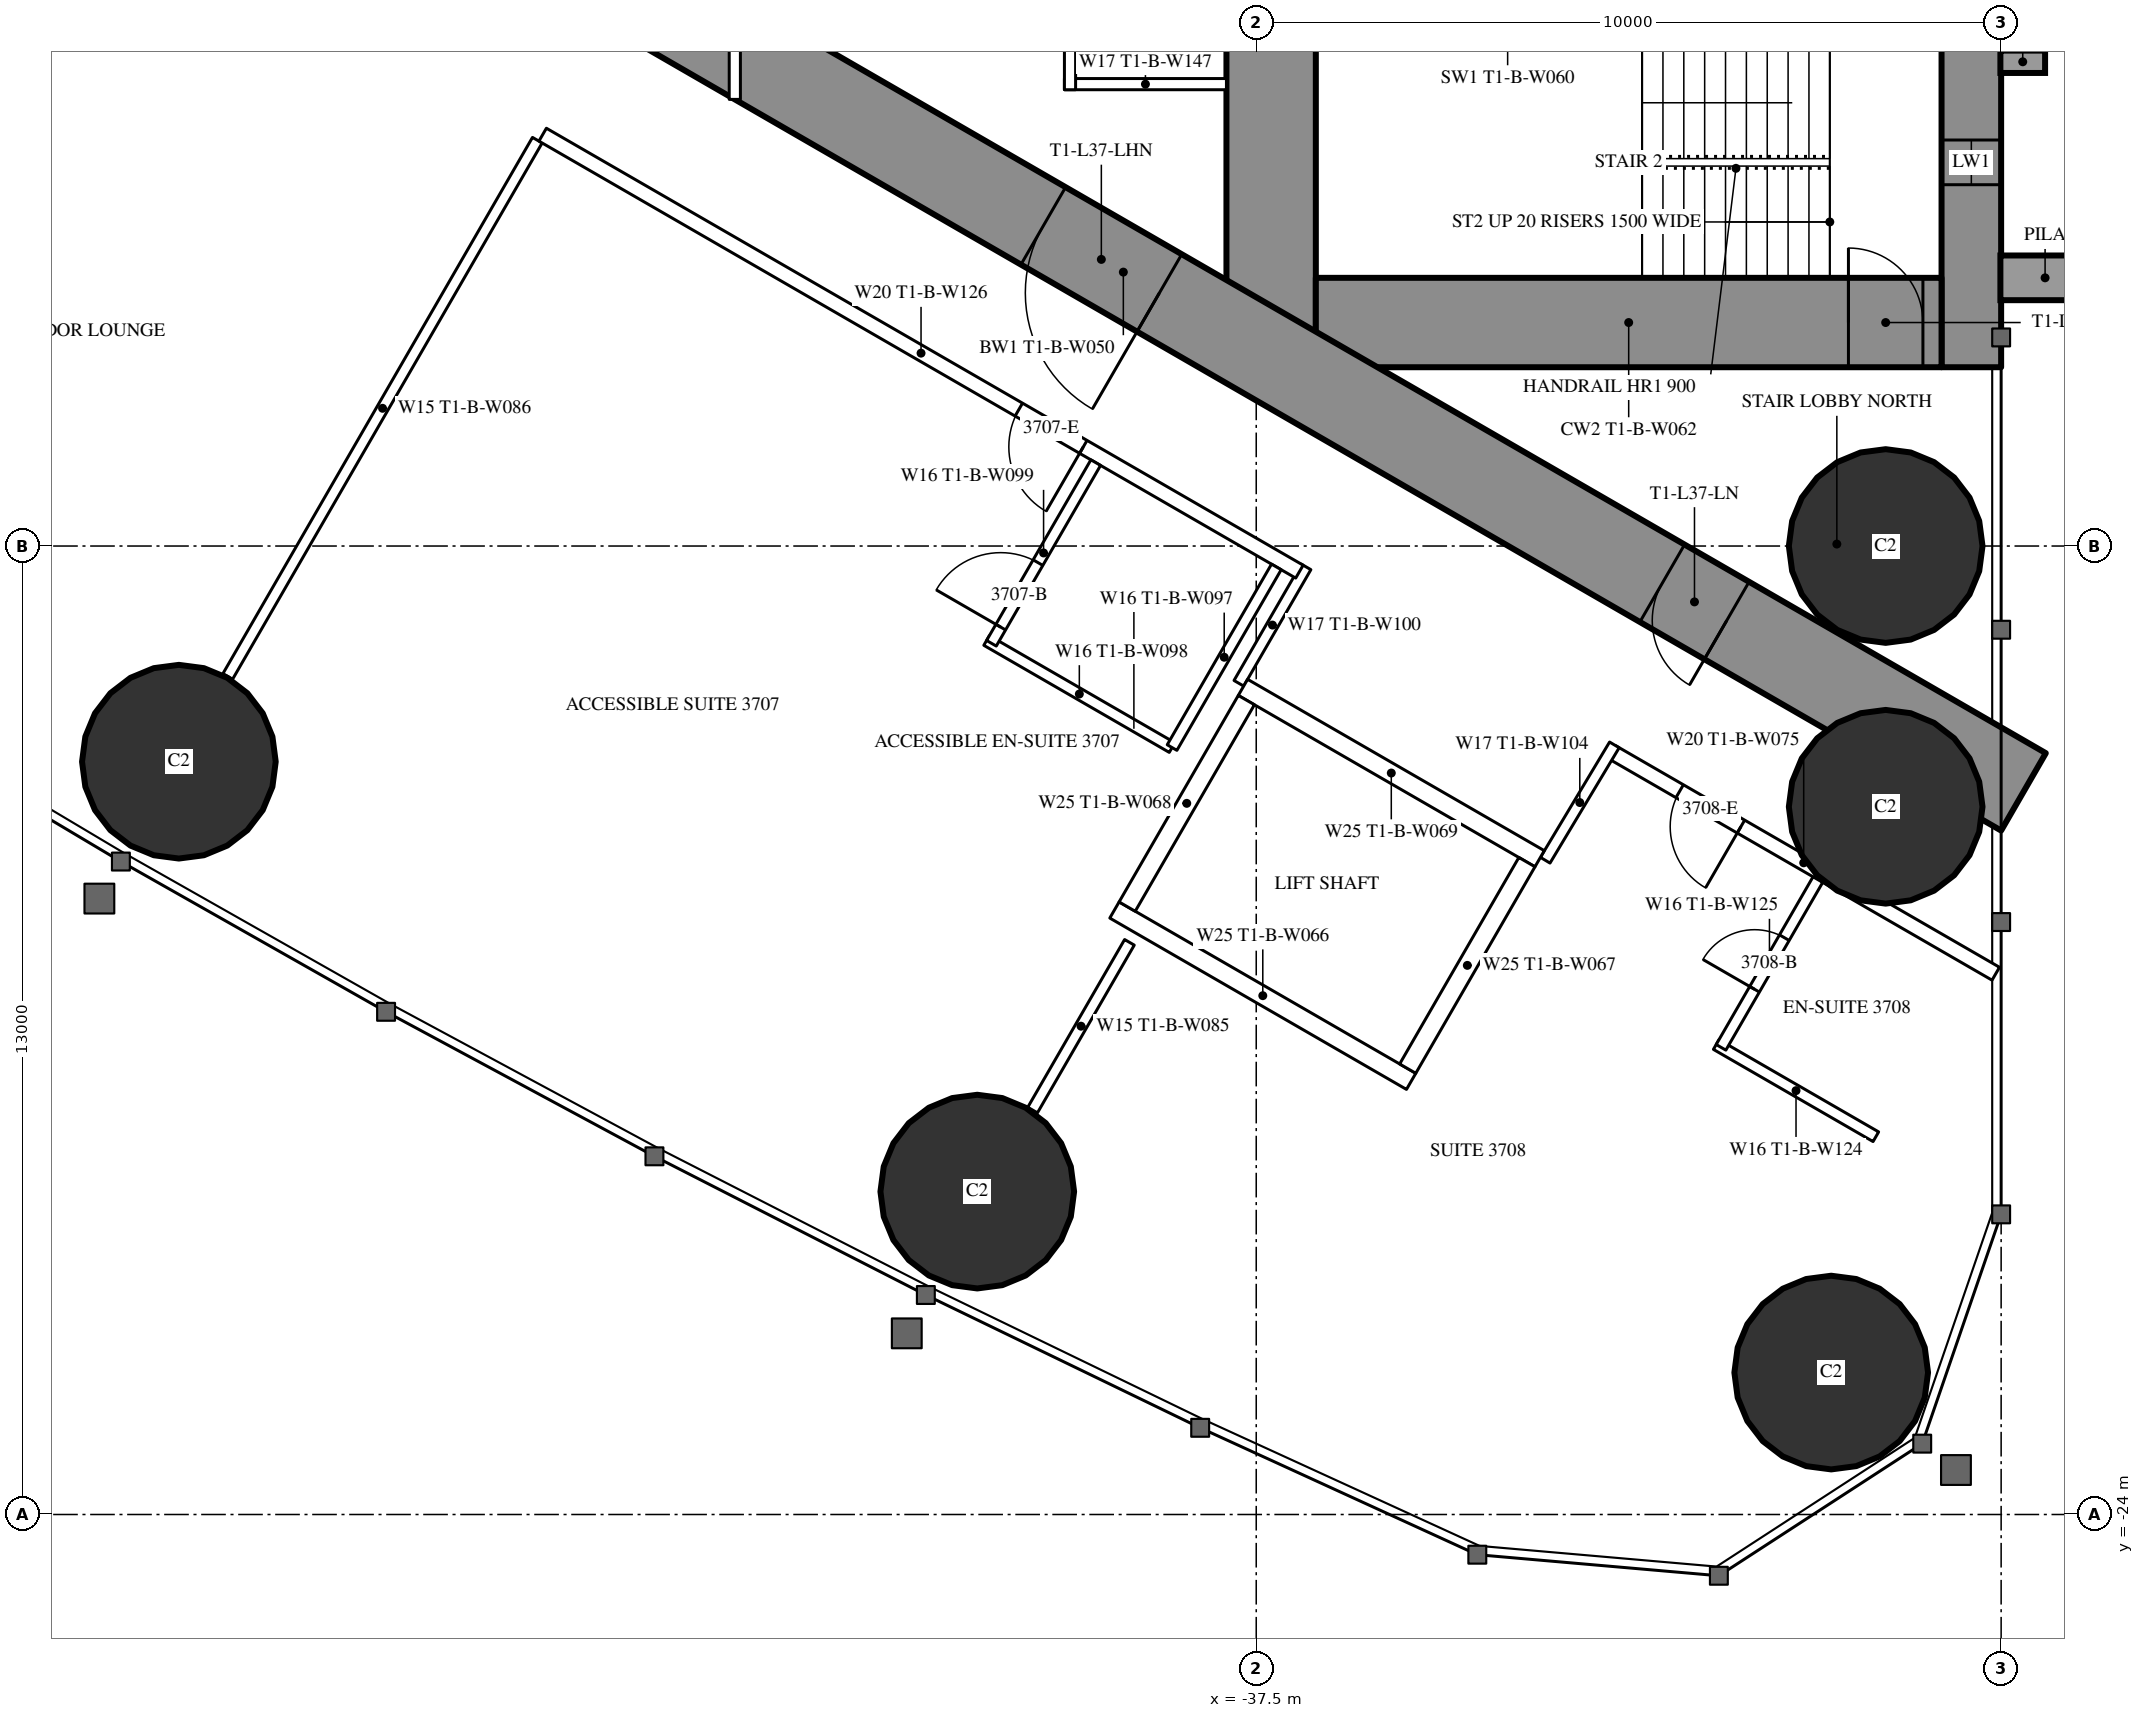
"""IFC4 building model, lengths in metres.
Left out: names, types, materials, properties, quantities, classifications, styles, units other than length and angle.
Written with IfcOpenShell. Run it as: python <this file> out.ifc"""

import sys

from ifc_helpers import new_model, si_unit, direction, frame, frame_2d, origin, origin_2d, place, context, subcontext, project, spatial, rectangle, hollow_circle, extrude, element, fill, save


model = new_model("IFC4")
c1 = context("Model", 3, precision=1e-05, world=origin(), true_north=direction((0.0, 1.0)))
c2 = subcontext(c1, "Body", "Model", "MODEL_VIEW")
j1 = project(units=[si_unit("LENGTHUNIT", "METRE"), si_unit("PLANEANGLEUNIT", "RADIAN")], contexts=[c1])
p1 = place(None, origin())
s1 = spatial("IfcSite", under=j1, at=p1, CompositionType="ELEMENT")
p2 = place(p1, origin())
s2 = spatial("IfcBuilding", under=s1, at=p2, CompositionType="ELEMENT")
p3 = place(p2, frame((0.0, 0.0, 139.6)))
s3 = spatial("IfcBuildingStorey", under=s2, at=p3, CompositionType="ELEMENT", Elevation=139.6)
for number, where, z_axis, x_axis in (
    (1, (-29.781, -22.095, 0.0), (0.0, 0.0, 1.0), (1.0, 0.0, 0.0)),
    (2, (-29.05, -11.0, 0.0), (0.0, 0.0, 1.0), (1.0, 0.0, 0.0)),
    (3, (-29.05, -14.5, 0.0), (0.0, 0.0, 1.0), (1.0, 0.0, 0.0)),
    (4, (-51.963, -13.895, 0.0), (0.0, 0.0, 1.0), (1.0, 0.0, 0.0)),
    (5, (-41.245, -19.666, 0.0), (0.0, 0.0, 1.0), (1.0, 0.0, 0.0)),
):
    element("IfcColumn", number, at=place(p3, frame(where, z_axis=z_axis, x_axis=x_axis)), inside=s3, PredefinedType="COLUMN", context=c2, shape_type="SweptSolid", body=[
        extrude(hollow_circle(Radius=1.3, WallThickness=0.1, at=origin_2d()), origin(), (0.0, 0.0, 1.0), 3.5),
    ])
p4 = place(p3, frame((-27.9, 8.6, 0.0), z_axis=(0.0, 0.0, 1.0), x_axis=(0.0, -1.0, 0.0)))
e6 = element("IfcWall", 6, at=p4, inside=s3, PredefinedType="SHEAR", context=c2, shape_type="SweptSolid", body=[
    extrude(rectangle(XDim=17.2, YDim=0.8, at=frame_2d((8.6, 0.0))), origin(), (0.0, 0.0, 1.0), 3.5),
])
p5 = place(p4, frame((2.45, 0.0, 0.6)))
e7 = element("IfcOpeningElement", 7, at=p5, cuts=e6, PredefinedType="OPENING", context=c2, shape_type="SweptSolid", body=[
    extrude(rectangle(XDim=0.6, YDim=2.1, at=frame_2d((0.3, 1.05))), frame((0.0, 0.41, 0.0), z_axis=(0.0, -1.0, 0.0), x_axis=(1.0, 0.0, 0.0)), (0.0, 0.0, 1.0), 0.82),
])
p6 = place(p4, frame((14.15, 0.0, 0.6)))
e8 = element("IfcOpeningElement", 8, at=p6, cuts=e6, PredefinedType="OPENING", context=c2, shape_type="SweptSolid", body=[
    extrude(rectangle(XDim=0.6, YDim=2.1, at=frame_2d((0.3, 1.05))), frame((0.0, 0.41, 0.0), z_axis=(0.0, -1.0, 0.0), x_axis=(1.0, 0.0, 0.0)), (0.0, 0.0, 1.0), 0.82),
])
p7 = place(p3, frame((-37.3, 8.6, 0.0), z_axis=(0.0, 0.0, 1.0), x_axis=(0.0, -1.0, 0.0)))
e9 = element("IfcWall", 9, at=p7, inside=s3, PredefinedType="SHEAR", context=c2, shape_type="SweptSolid", body=[
    extrude(rectangle(XDim=17.2, YDim=1.2, at=frame_2d((8.6, 0.0))), origin(), (0.0, 0.0, 1.0), 3.5),
])
p8 = place(p7, frame((7.7, 0.0, 0.0)))
e10 = element("IfcOpeningElement", 10, at=p8, cuts=e9, PredefinedType="OPENING", context=c2, shape_type="SweptSolid", body=[
    extrude(rectangle(XDim=1.8, YDim=2.2, at=frame_2d((0.9, 1.1))), frame((0.0, 0.61, 0.0), z_axis=(0.0, -1.0, 0.0), x_axis=(1.0, 0.0, 0.0)), (0.0, 0.0, 1.0), 1.22),
])
p9 = place(p3, frame((-28.3, -8.0, 0.0), z_axis=(0.0, 0.0, 1.0), x_axis=(-1.0, 0.0, 0.0)))
e11 = element("IfcWall", 11, at=p9, inside=s3, PredefinedType="SHEAR", context=c2, shape_type="SweptSolid", body=[
    extrude(rectangle(XDim=8.4, YDim=1.2, at=frame_2d((4.2, 0.0))), origin(), (0.0, 0.0, 1.0), 3.5),
])
p10 = place(p9, frame((0.25, 0.0, 0.0)))
e12 = element("IfcOpeningElement", 12, at=p10, cuts=e11, PredefinedType="OPENING", context=c2, shape_type="SweptSolid", body=[
    extrude(rectangle(XDim=1.0, YDim=2.2, at=frame_2d((0.5, 1.1))), frame((0.0, 0.61, 0.0), z_axis=(0.0, -1.0, 0.0), x_axis=(1.0, 0.0, 0.0)), (0.0, 0.0, 1.0), 1.22),
])
p11 = place(p3, frame((-27.2, -14.3, 0.0), z_axis=(0.0, 0.0, 1.0), x_axis=(-0.866024021859, 0.500002393557, 0.0)))
e13 = element("IfcWall", 13, at=p11, inside=s3, PredefinedType="SHEAR", context=c2, shape_type="SweptSolid", body=[
    extrude(rectangle(XDim=27.907, YDim=1.2, at=frame_2d((13.954, 0.0))), origin(), (0.0, 0.0, 1.0), 3.5),
])
p12 = place(p11, frame((4.6, 0.0, 0.0)))
e14 = element("IfcOpeningElement", 14, at=p12, cuts=e13, PredefinedType="OPENING", context=c2, shape_type="SweptSolid", body=[
    extrude(rectangle(XDim=1.0, YDim=2.2, at=frame_2d((0.5, 1.1))), frame((0.0, 0.61, 0.0), z_axis=(0.0, -1.0, 0.0), x_axis=(1.0, 0.0, 0.0)), (0.0, 0.0, 1.0), 1.22),
])
p13 = place(p11, frame((13.395, 0.0, 0.0)))
e15 = element("IfcOpeningElement", 15, at=p13, cuts=e13, PredefinedType="OPENING", context=c2, shape_type="SweptSolid", body=[
    extrude(rectangle(XDim=1.8, YDim=2.2, at=frame_2d((0.9, 1.1))), frame((0.0, 0.61, 0.0), z_axis=(0.0, -1.0, 0.0), x_axis=(1.0, 0.0, 0.0)), (0.0, 0.0, 1.0), 1.22),
])
p14 = place(p3, frame((-47.151, -5.552, 0.0), z_axis=(0.0, 0.0, 1.0), x_axis=(-0.500003012045, -0.866023664773, 0.0)))
e16 = element("IfcWall", 16, at=p14, inside=s3, PredefinedType="PARTITIONING", context=c2, shape_type="SweptSolid", body=[
    extrude(rectangle(XDim=8.311, YDim=0.15, at=frame_2d((4.156, 0.0))), origin(), (0.0, 0.0, 1.0), 2.2),
])
p15 = place(p3, frame((-39.202, -16.32, 0.0), z_axis=(0.0, 0.0, 1.0), x_axis=(-0.49997716683, -0.86603858612, 0.0)))
e17 = element("IfcWall", 17, at=p15, inside=s3, PredefinedType="PARTITIONING", context=c2, shape_type="SweptSolid", body=[
    extrude(rectangle(XDim=2.6, YDim=0.15, at=frame_2d((1.3, 0.0))), origin(), (0.0, 0.0, 1.0), 3.25),
])
p16 = place(p3, frame((-27.572, -16.741, 0.0), z_axis=(0.0, 0.0, 1.0), x_axis=(-0.866024464444, 0.500001626982, 0.0)))
e18 = element("IfcWall", 18, at=p16, inside=s3, PredefinedType="PARTITIONING", context=c2, shape_type="SweptSolid", body=[
    extrude(rectangle(XDim=5.955, YDim=0.2, at=frame_2d((2.978, 0.0))), origin(), (0.0, 0.0, 1.0), 3.25),
])
p17 = place(p16, frame((3.95, 0.0, 0.0)))
e19 = element("IfcOpeningElement", 19, at=p17, cuts=e18, PredefinedType="OPENING", context=c2, shape_type="SweptSolid", body=[
    extrude(rectangle(XDim=0.95, YDim=2.2, at=frame_2d((0.475, 1.1))), frame((0.0, 0.11, 0.0), z_axis=(0.0, -1.0, 0.0), x_axis=(1.0, 0.0, 0.0)), (0.0, 0.0, 1.0), 0.22),
])
p18 = place(p3, frame((-36.831, -11.28, 0.0), z_axis=(0.0, 0.0, 1.0), x_axis=(-0.499937177781, -0.866061671171, 0.0)))
e20 = element("IfcWall", 20, at=p18, inside=s3, PredefinedType="PARTITIONING", context=c2, shape_type="SweptSolid", body=[
    extrude(rectangle(XDim=1.804, YDim=0.15, at=frame_2d((0.902, 0.0))), origin(), (0.0, 0.0, 1.0), 3.25),
])
p19 = place(p3, frame((-33.621, -15.218, 0.0), z_axis=(0.0, 0.0, 1.0), x_axis=(0.514336634837, 0.857588377991, 0.0)))
e21 = element("IfcWall", 21, at=p19, inside=s3, PredefinedType="PARTITIONING", context=c2, shape_type="SweptSolid", body=[
    extrude(rectangle(XDim=1.805, YDim=0.15, at=frame_2d((0.903, 0.0))), origin(), (0.0, 0.0, 1.0), 3.25),
])
p20 = place(p3, frame((-36.92, -11.344, 0.0), z_axis=(0.0, 0.0, 1.0), x_axis=(-0.866027897759, 0.499995680284, 0.0)))
e22 = element("IfcWall", 22, at=p20, inside=s3, PredefinedType="PARTITIONING", context=c2, shape_type="SweptSolid", body=[
    extrude(rectangle(XDim=11.731, YDim=0.2, at=frame_2d((5.865, 0.0))), origin(), (0.0, 0.0, 1.0), 3.25),
])
p21 = place(p20, frame((3.35, 0.0, 0.0)))
e23 = element("IfcOpeningElement", 23, at=p21, cuts=e22, PredefinedType="OPENING", context=c2, shape_type="SweptSolid", body=[
    extrude(rectangle(XDim=1.0, YDim=2.2, at=frame_2d((0.5, 1.1))), frame((0.0, 0.11, 0.0), z_axis=(0.0, -1.0, 0.0), x_axis=(1.0, 0.0, 0.0)), (0.0, 0.0, 1.0), 0.22),
])
p22 = place(p3, frame((-38.63, -13.705, 0.0), z_axis=(0.0, 0.0, 1.0), x_axis=(-0.866018712932, 0.500011588718, 0.0)))
e24 = element("IfcWall", 24, at=p22, inside=s3, PredefinedType="PARTITIONING", context=c2, shape_type="SweptSolid", body=[
    extrude(rectangle(XDim=2.875, YDim=0.15, at=frame_2d((1.438, 0.0))), origin(), (0.0, 0.0, 1.0), 3.25),
])
p23 = place(p3, frame((-39.655, -9.88, 0.0), z_axis=(0.0, 0.0, 1.0), x_axis=(-0.500049511043, -0.865996816683, 0.0)))
e25 = element("IfcWall", 25, at=p23, inside=s3, PredefinedType="PARTITIONING", context=c2, shape_type="SweptSolid", body=[
    extrude(rectangle(XDim=2.8, YDim=0.15, at=frame_2d((1.4, 0.0))), origin(), (0.0, 0.0, 1.0), 3.25),
])
p24 = place(p23, frame((1.55, 0.0, 0.0)))
e26 = element("IfcOpeningElement", 26, at=p24, cuts=e25, PredefinedType="OPENING", context=c2, shape_type="SweptSolid", body=[
    extrude(rectangle(XDim=1.0, YDim=2.2, at=frame_2d((0.5, 1.1))), frame((0.0, 0.085, 0.0), z_axis=(0.0, -1.0, 0.0), x_axis=(1.0, 0.0, 0.0)), (0.0, 0.0, 1.0), 0.17),
])
p25 = place(p3, frame((-37.23, -11.281, 0.0), z_axis=(0.0, 0.0, 1.0), x_axis=(-0.500049511043, -0.865996816683, 0.0)))
e27 = element("IfcWall", 27, at=p25, inside=s3, PredefinedType="PARTITIONING", context=c2, shape_type="SweptSolid", body=[
    extrude(rectangle(XDim=2.8, YDim=0.15, at=frame_2d((1.4, 0.0))), origin(), (0.0, 0.0, 1.0), 3.25),
])
p26 = place(p3, frame((-29.182, -18.929, 0.0), z_axis=(0.0, 0.0, 1.0), x_axis=(-0.866006523861, 0.500032699561, 0.0)))
e28 = element("IfcWall", 28, at=p26, inside=s3, PredefinedType="PARTITIONING", context=c2, shape_type="SweptSolid", body=[
    extrude(rectangle(XDim=2.475, YDim=0.15, at=frame_2d((1.237, 0.0))), origin(), (0.0, 0.0, 1.0), 3.25),
])
p27 = place(p3, frame((-29.96, -15.478, 0.0), z_axis=(0.0, 0.0, 1.0), x_axis=(-0.500006934395, -0.866021400173, 0.0)))
e29 = element("IfcWall", 29, at=p27, inside=s3, PredefinedType="PARTITIONING", context=c2, shape_type="SweptSolid", body=[
    extrude(rectangle(XDim=2.6, YDim=0.15, at=frame_2d((1.3, 0.0))), origin(), (0.0, 0.0, 1.0), 3.25),
])
p28 = place(p27, frame((0.9, 0.0, 0.0)))
e30 = element("IfcOpeningElement", 30, at=p28, cuts=e29, PredefinedType="OPENING", context=c2, shape_type="SweptSolid", body=[
    extrude(rectangle(XDim=0.8, YDim=2.2, at=frame_2d((0.4, 1.1))), frame((0.0, 0.085, 0.0), z_axis=(0.0, -1.0, 0.0), x_axis=(1.0, 0.0, 0.0)), (0.0, 0.0, 1.0), 0.17),
])
p29 = place(p3, frame((-37.9, -4.8, 0.0), z_axis=(0.0, 0.0, 1.0), x_axis=(-1.0, 0.0, 0.0)))
e31 = element("IfcWall", 31, at=p29, inside=s3, PredefinedType="PARTITIONING", context=c2, shape_type="SweptSolid", body=[
    extrude(rectangle(XDim=2.175, YDim=0.15, at=frame_2d((1.087, 0.0))), origin(), (0.0, 0.0, 1.0), 3.25),
])
p30 = place(p3, frame((-40.0, -1.125, 0.0), z_axis=(0.0, 0.0, 1.0), x_axis=(0.0, -1.0, 0.0)))
e32 = element("IfcWall", 32, at=p30, inside=s3, PredefinedType="PARTITIONING", context=c2, shape_type="SweptSolid", body=[
    extrude(rectangle(XDim=3.75, YDim=0.15, at=frame_2d((1.875, 0.0))), origin(), (0.0, 0.0, 1.0), 3.25),
])
p31 = place(p30, frame((1.375, 0.0, 0.0)))
e33 = element("IfcOpeningElement", 33, at=p31, cuts=e32, PredefinedType="OPENING", context=c2, shape_type="SweptSolid", body=[
    extrude(rectangle(XDim=1.0, YDim=2.2, at=frame_2d((0.5, 1.1))), frame((0.0, 0.085, 0.0), z_axis=(0.0, -1.0, 0.0), x_axis=(1.0, 0.0, 0.0)), (0.0, 0.0, 1.0), 0.17),
])
p32 = place(p3, frame((-44.5, 5.005, 0.0), z_axis=(0.0, 0.0, 1.0), x_axis=(0.0, -1.0, 0.0)))
e34 = element("IfcWall", 34, at=p32, inside=s3, PredefinedType="PARTITIONING", context=c2, shape_type="SweptSolid", body=[
    extrude(rectangle(XDim=10.009, YDim=0.15, at=frame_2d((5.005, 0.0))), origin(), (0.0, 0.0, 1.0), 2.45),
])
p33 = place(p32, frame((4.505, 0.0, 0.0)))
e35 = element("IfcOpeningElement", 35, at=p33, cuts=e34, PredefinedType="OPENING", context=c2, shape_type="SweptSolid", body=[
    extrude(rectangle(XDim=1.0, YDim=2.2, at=frame_2d((0.5, 1.1))), frame((0.0, 0.085, 0.0), z_axis=(0.0, -1.0, 0.0), x_axis=(1.0, 0.0, 0.0)), (0.0, 0.0, 1.0), 0.17),
])
p34 = place(p3, frame((-33.696, -15.197, 0.0), z_axis=(0.0, 0.0, 1.0), x_axis=(-0.865976953817, 0.500083908417, 0.0)))
e36 = element("IfcWall", 36, at=p34, inside=s3, PredefinedType="PARTITIONING", context=c2, shape_type="SweptSolid", body=[
    extrude(rectangle(XDim=4.599, YDim=0.25, at=frame_2d((2.3, 0.0))), origin(), (0.0, 0.0, 1.0), 3.25),
])
p35 = place(p3, frame((-35.42, -18.186, 0.0), z_axis=(0.0, 0.0, 1.0), x_axis=(-0.865990227814, 0.50006092162, 0.0)))
e37 = element("IfcWall", 37, at=p35, inside=s3, PredefinedType="PARTITIONING", context=c2, shape_type="SweptSolid", body=[
    extrude(rectangle(XDim=4.6, YDim=0.25, at=frame_2d((2.3, 0.0))), origin(), (0.0, 0.0, 1.0), 3.25),
])
p36 = place(p3, frame((-33.866, -15.243, 0.0), z_axis=(0.0, 0.0, 1.0), x_axis=(-0.499929347863, -0.866066190972, 0.0)))
e38 = element("IfcWall", 38, at=p36, inside=s3, PredefinedType="PARTITIONING", context=c2, shape_type="SweptSolid", body=[
    extrude(rectangle(XDim=3.201, YDim=0.25, at=frame_2d((1.6, 0.0))), origin(), (0.0, 0.0, 1.0), 3.25),
])
p37 = place(p3, frame((-37.633, -13.068, 0.0), z_axis=(0.0, 0.0, 1.0), x_axis=(-0.499872130319, -0.866099216793, 0.0)))
e39 = element("IfcWall", 39, at=p37, inside=s3, PredefinedType="PARTITIONING", context=c2, shape_type="SweptSolid", body=[
    extrude(rectangle(XDim=3.2, YDim=0.25, at=frame_2d((1.6, 0.0))), origin(), (0.0, 0.0, 1.0), 3.25),
])
p38 = place(p24, origin())
e40 = element("IfcDoor", 40, at=p38, inside=s3, OperationType="SINGLE_SWING_RIGHT", PredefinedType="DOOR", context=c2, shape_type="SweptSolid", body=[
    extrude(rectangle(XDim=1.0, YDim=2.2, at=frame_2d((0.5, 1.1))), frame((0.0, 0.025, 0.0), z_axis=(0.0, -1.0, 0.0), x_axis=(1.0, 0.0, 0.0)), (0.0, 0.0, 1.0), 0.05),
])
fill(e26, e40)
p39 = place(p21, origin())
e41 = element("IfcDoor", 41, at=p39, inside=s3, OperationType="SINGLE_SWING_LEFT", PredefinedType="DOOR", context=c2, shape_type="SweptSolid", body=[
    extrude(rectangle(XDim=1.0, YDim=2.2, at=frame_2d((0.5, 1.1))), frame((0.0, 0.025, 0.0), z_axis=(0.0, -1.0, 0.0), x_axis=(1.0, 0.0, 0.0)), (0.0, 0.0, 1.0), 0.05),
])
fill(e23, e41)
p40 = place(p28, origin())
e42 = element("IfcDoor", 42, at=p40, inside=s3, OperationType="SINGLE_SWING_RIGHT", PredefinedType="DOOR", context=c2, shape_type="SweptSolid", body=[
    extrude(rectangle(XDim=0.8, YDim=2.2, at=frame_2d((0.4, 1.1))), frame((0.0, 0.025, 0.0), z_axis=(0.0, -1.0, 0.0), x_axis=(1.0, 0.0, 0.0)), (0.0, 0.0, 1.0), 0.05),
])
fill(e30, e42)
p41 = place(p17, origin())
e43 = element("IfcDoor", 43, at=p41, inside=s3, OperationType="SINGLE_SWING_LEFT", PredefinedType="DOOR", context=c2, shape_type="SweptSolid", body=[
    extrude(rectangle(XDim=0.95, YDim=2.2, at=frame_2d((0.475, 1.1))), frame((0.0, 0.025, 0.0), z_axis=(0.0, -1.0, 0.0), x_axis=(1.0, 0.0, 0.0)), (0.0, 0.0, 1.0), 0.05),
])
fill(e19, e43)
p42 = place(p12, origin())
e44 = element("IfcDoor", 44, at=p42, inside=s3, OperationType="SINGLE_SWING_LEFT", PredefinedType="DOOR", context=c2, shape_type="SweptSolid", body=[
    extrude(rectangle(XDim=1.0, YDim=2.2, at=frame_2d((0.5, 1.1))), frame((0.0, 0.025, 0.0), z_axis=(0.0, -1.0, 0.0), x_axis=(1.0, 0.0, 0.0)), (0.0, 0.0, 1.0), 0.05),
])
fill(e14, e44)
p43 = place(p13, origin())
e45 = element("IfcDoor", 45, at=p43, inside=s3, OperationType="DOUBLE_DOOR_SINGLE_SWING", PredefinedType="DOOR", context=c2, shape_type="SweptSolid", body=[
    extrude(rectangle(XDim=1.8, YDim=2.2, at=frame_2d((0.9, 1.1))), frame((0.0, 0.025, 0.0), z_axis=(0.0, -1.0, 0.0), x_axis=(1.0, 0.0, 0.0)), (0.0, 0.0, 1.0), 0.05),
])
fill(e15, e45)
p44 = place(p10, origin())
e46 = element("IfcDoor", 46, at=p44, inside=s3, OperationType="SINGLE_SWING_RIGHT", PredefinedType="DOOR", context=c2, shape_type="SweptSolid", body=[
    extrude(rectangle(XDim=1.0, YDim=2.2, at=frame_2d((0.5, 1.1))), frame((0.0, 0.025, 0.0), z_axis=(0.0, -1.0, 0.0), x_axis=(1.0, 0.0, 0.0)), (0.0, 0.0, 1.0), 0.05),
])
fill(e12, e46)
p45 = place(p6, origin())
e47 = element("IfcWindow", 47, at=p45, inside=s3, PartitioningType="SINGLE_PANEL", PredefinedType="WINDOW", context=c2, shape_type="SweptSolid", body=[
    extrude(rectangle(XDim=0.6, YDim=2.1, at=frame_2d((0.3, 1.05))), frame((0.0, 0.03, 0.0), z_axis=(0.0, -1.0, 0.0), x_axis=(1.0, 0.0, 0.0)), (0.0, 0.0, 1.0), 0.06),
])
fill(e8, e47)
save(model, sys.argv[1])
